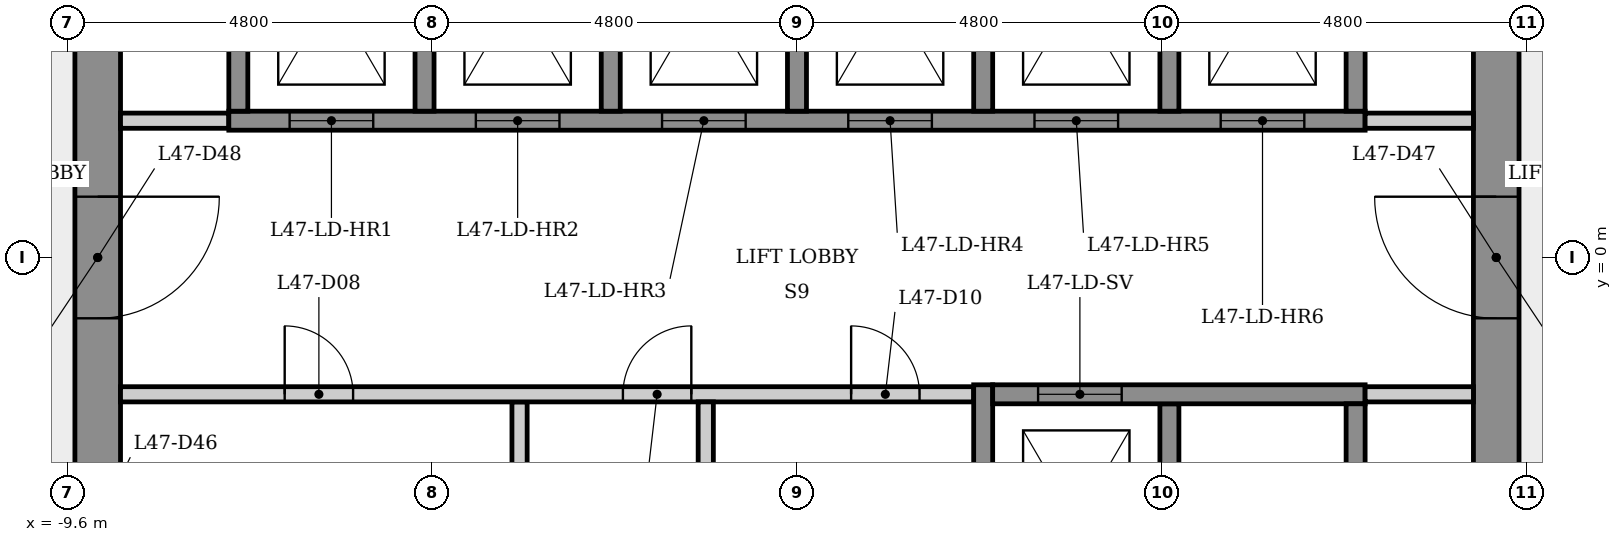
"""IFC4 building model, lengths in metres.
Left out: names, types, materials, properties, quantities, classifications, styles, units other than length and angle.
Written with IfcOpenShell. Run it as: python <this file> out.ifc"""

import sys

from ifc_helpers import new_model, si_unit, direction, frame, frame_2d, origin, place, context, subcontext, project, spatial, rectangle, extrude, element, fill, save


model = new_model("IFC4")
c1 = context("Model", 3, precision=1e-05, world=origin(), true_north=direction((0.0, 1.0)))
c2 = subcontext(c1, "Body", "Model", "MODEL_VIEW")
j1 = project(units=[si_unit("LENGTHUNIT", "METRE"), si_unit("PLANEANGLEUNIT", "RADIAN")], contexts=[c1])
p1 = place(None, origin())
s1 = spatial("IfcSite", under=j1, at=p1, CompositionType="ELEMENT")
p2 = place(p1, origin())
s2 = spatial("IfcBuilding", under=s1, at=p2, CompositionType="ELEMENT")
p3 = place(p2, frame((0.0, 0.0, 176.5)))
s3 = spatial("IfcBuildingStorey", under=s2, at=p3, CompositionType="ELEMENT", Elevation=176.5)
p4 = place(p3, frame((9.2, -5.485, 0.0), z_axis=(0.0, 0.0, 1.0), x_axis=(0.0, 1.0, 0.0)))
e1 = element("IfcWall", 1, at=p4, inside=s3, PredefinedType="SHEAR", context=c2, shape_type="SweptSolid", body=[
    extrude(rectangle(XDim=10.97, YDim=0.6, at=frame_2d((5.485, 0.0))), origin(), (0.0, 0.0, 1.0), 3.4),
])
p5 = place(p4, frame((4.685, 0.0, 0.0)))
e2 = element("IfcOpeningElement", 2, at=p5, cuts=e1, PredefinedType="OPENING", context=c2, shape_type="SweptSolid", body=[
    extrude(rectangle(XDim=1.6, YDim=2.1, at=frame_2d((0.8, 1.05))), frame((0.0, 0.31, 0.0), z_axis=(0.0, -1.0, 0.0), x_axis=(1.0, 0.0, 0.0)), (0.0, 0.0, 1.0), 0.62),
])
p6 = place(p3, frame((-9.2, 5.485, 0.0), z_axis=(0.0, 0.0, 1.0), x_axis=(0.0, -1.0, 0.0)))
e3 = element("IfcWall", 3, at=p6, inside=s3, PredefinedType="SHEAR", context=c2, shape_type="SweptSolid", body=[
    extrude(rectangle(XDim=10.97, YDim=0.6, at=frame_2d((5.485, 0.0))), origin(), (0.0, 0.0, 1.0), 3.4),
])
p7 = place(p6, frame((8.516, 0.0, 0.0)))
e4 = element("IfcOpeningElement", 4, at=p7, cuts=e3, PredefinedType="OPENING", context=c2, shape_type="SweptSolid", body=[
    extrude(rectangle(XDim=0.9, YDim=2.1, at=frame_2d((0.45, 1.05))), frame((0.0, 0.31, 0.0), z_axis=(0.0, -1.0, 0.0), x_axis=(1.0, 0.0, 0.0)), (0.0, 0.0, 1.0), 0.62),
])
p8 = place(p6, frame((4.685, 0.0, 0.0)))
e5 = element("IfcOpeningElement", 5, at=p8, cuts=e3, PredefinedType="OPENING", context=c2, shape_type="SweptSolid", body=[
    extrude(rectangle(XDim=1.6, YDim=2.1, at=frame_2d((0.8, 1.05))), frame((0.0, 0.31, 0.0), z_axis=(0.0, -1.0, 0.0), x_axis=(1.0, 0.0, 0.0)), (0.0, 0.0, 1.0), 0.62),
])
p9 = place(p3, frame((-8.9, 1.8, 0.0), z_axis=(0.0, 0.0, 1.0), x_axis=(1.0, 0.0, 0.0)))
e6 = element("IfcWall", 6, at=p9, inside=s3, PredefinedType="PARTITIONING", context=c2, shape_type="SweptSolid", body=[
    extrude(rectangle(XDim=1.425, YDim=0.2, at=frame_2d((0.712, 0.0))), origin(), (0.0, 0.0, 1.0), 3.05),
])
p10 = place(p3, frame((-7.475, 1.8, 0.0), z_axis=(0.0, 0.0, 1.0), x_axis=(1.0, 0.0, 0.0)))
e7 = element("IfcWall", 7, at=p10, inside=s3, PredefinedType="SHEAR", context=c2, shape_type="SweptSolid", body=[
    extrude(rectangle(XDim=14.95, YDim=0.25, at=frame_2d((7.475, 0.0))), origin(), (0.0, 0.0, 1.0), 3.05),
])
p11 = place(p10, frame((0.8, 0.0, 0.0)))
e8 = element("IfcOpeningElement", 8, at=p11, cuts=e7, PredefinedType="OPENING", context=c2, shape_type="SweptSolid", body=[
    extrude(rectangle(XDim=1.1, YDim=2.1, at=frame_2d((0.55, 1.05))), frame((0.0, 0.135, 0.0), z_axis=(0.0, -1.0, 0.0), x_axis=(1.0, 0.0, 0.0)), (0.0, 0.0, 1.0), 0.27),
])
p12 = place(p10, frame((3.25, 0.0, 0.0)))
e9 = element("IfcOpeningElement", 9, at=p12, cuts=e7, PredefinedType="OPENING", context=c2, shape_type="SweptSolid", body=[
    extrude(rectangle(XDim=1.1, YDim=2.1, at=frame_2d((0.55, 1.05))), frame((0.0, 0.135, 0.0), z_axis=(0.0, -1.0, 0.0), x_axis=(1.0, 0.0, 0.0)), (0.0, 0.0, 1.0), 0.27),
])
p13 = place(p10, frame((5.7, 0.0, 0.0)))
e10 = element("IfcOpeningElement", 10, at=p13, cuts=e7, PredefinedType="OPENING", context=c2, shape_type="SweptSolid", body=[
    extrude(rectangle(XDim=1.1, YDim=2.1, at=frame_2d((0.55, 1.05))), frame((0.0, 0.135, 0.0), z_axis=(0.0, -1.0, 0.0), x_axis=(1.0, 0.0, 0.0)), (0.0, 0.0, 1.0), 0.27),
])
p14 = place(p10, frame((8.15, 0.0, 0.0)))
e11 = element("IfcOpeningElement", 11, at=p14, cuts=e7, PredefinedType="OPENING", context=c2, shape_type="SweptSolid", body=[
    extrude(rectangle(XDim=1.1, YDim=2.1, at=frame_2d((0.55, 1.05))), frame((0.0, 0.135, 0.0), z_axis=(0.0, -1.0, 0.0), x_axis=(1.0, 0.0, 0.0)), (0.0, 0.0, 1.0), 0.27),
])
p15 = place(p10, frame((10.6, 0.0, 0.0)))
e12 = element("IfcOpeningElement", 12, at=p15, cuts=e7, PredefinedType="OPENING", context=c2, shape_type="SweptSolid", body=[
    extrude(rectangle(XDim=1.1, YDim=2.1, at=frame_2d((0.55, 1.05))), frame((0.0, 0.135, 0.0), z_axis=(0.0, -1.0, 0.0), x_axis=(1.0, 0.0, 0.0)), (0.0, 0.0, 1.0), 0.27),
])
p16 = place(p10, frame((13.05, 0.0, 0.0)))
e13 = element("IfcOpeningElement", 13, at=p16, cuts=e7, PredefinedType="OPENING", context=c2, shape_type="SweptSolid", body=[
    extrude(rectangle(XDim=1.1, YDim=2.1, at=frame_2d((0.55, 1.05))), frame((0.0, 0.135, 0.0), z_axis=(0.0, -1.0, 0.0), x_axis=(1.0, 0.0, 0.0)), (0.0, 0.0, 1.0), 0.27),
])
p17 = place(p3, frame((-7.35, 1.925, 0.0), z_axis=(0.0, 0.0, 1.0), x_axis=(0.0, 1.0, 0.0)))
e14 = element("IfcWall", 14, at=p17, inside=s3, PredefinedType="SHEAR", context=c2, shape_type="SweptSolid", body=[
    extrude(rectangle(XDim=4.036, YDim=0.25, at=frame_2d((2.018, 0.0))), origin(), (0.0, 0.0, 1.0), 3.05),
])
p18 = place(p3, frame((-4.9, 5.025, 0.0), z_axis=(0.0, 0.0, 1.0), x_axis=(0.0, -1.0, 0.0)))
e15 = element("IfcWall", 15, at=p18, inside=s3, PredefinedType="SHEAR", context=c2, shape_type="SweptSolid", body=[
    extrude(rectangle(XDim=3.1, YDim=0.25, at=frame_2d((1.55, 0.0))), origin(), (0.0, 0.0, 1.0), 3.4),
])
p19 = place(p3, frame((-3.65, -1.9, 0.0), z_axis=(0.0, 0.0, 1.0), x_axis=(0.0, -1.0, 0.0)))
e16 = element("IfcWall", 16, at=p19, inside=s3, PredefinedType="PARTITIONING", context=c2, shape_type="SweptSolid", body=[
    extrude(rectangle(XDim=3.15, YDim=0.2, at=frame_2d((1.575, 0.0))), origin(), (0.0, 0.0, 1.0), 3.05),
])
p20 = place(p3, frame((-8.9, -1.8, 0.0), z_axis=(0.0, 0.0, 1.0), x_axis=(1.0, 0.0, 0.0)))
e17 = element("IfcWall", 17, at=p20, inside=s3, PredefinedType="PARTITIONING", context=c2, shape_type="SweptSolid", body=[
    extrude(rectangle(XDim=11.225, YDim=0.2, at=frame_2d((5.613, 0.0))), origin(), (0.0, 0.0, 1.0), 3.05),
])
p21 = place(p20, frame((2.16, 0.0, 0.0)))
e18 = element("IfcOpeningElement", 18, at=p21, cuts=e17, PredefinedType="OPENING", context=c2, shape_type="SweptSolid", body=[
    extrude(rectangle(XDim=0.9, YDim=2.1, at=frame_2d((0.45, 1.05))), frame((0.0, 0.11, 0.0), z_axis=(0.0, -1.0, 0.0), x_axis=(1.0, 0.0, 0.0)), (0.0, 0.0, 1.0), 0.22),
])
p22 = place(p20, frame((6.61, 0.0, 0.0)))
e19 = element("IfcOpeningElement", 19, at=p22, cuts=e17, PredefinedType="OPENING", context=c2, shape_type="SweptSolid", body=[
    extrude(rectangle(XDim=0.9, YDim=2.1, at=frame_2d((0.45, 1.05))), frame((0.0, 0.11, 0.0), z_axis=(0.0, -1.0, 0.0), x_axis=(1.0, 0.0, 0.0)), (0.0, 0.0, 1.0), 0.22),
])
p23 = place(p20, frame((9.613, 0.0, 0.0)))
e20 = element("IfcOpeningElement", 20, at=p23, cuts=e17, PredefinedType="OPENING", context=c2, shape_type="SweptSolid", body=[
    extrude(rectangle(XDim=0.9, YDim=2.1, at=frame_2d((0.45, 1.05))), frame((0.0, 0.11, 0.0), z_axis=(0.0, -1.0, 0.0), x_axis=(1.0, 0.0, 0.0)), (0.0, 0.0, 1.0), 0.22),
])
p24 = place(p3, frame((-2.45, 5.025, 0.0), z_axis=(0.0, 0.0, 1.0), x_axis=(0.0, -1.0, 0.0)))
e21 = element("IfcWall", 21, at=p24, inside=s3, PredefinedType="SHEAR", context=c2, shape_type="SweptSolid", body=[
    extrude(rectangle(XDim=3.1, YDim=0.25, at=frame_2d((1.55, 0.0))), origin(), (0.0, 0.0, 1.0), 3.4),
])
p25 = place(p3, frame((-1.2, -1.9, 0.0), z_axis=(0.0, 0.0, 1.0), x_axis=(0.0, -1.0, 0.0)))
e22 = element("IfcWall", 22, at=p25, inside=s3, PredefinedType="PARTITIONING", context=c2, shape_type="SweptSolid", body=[
    extrude(rectangle(XDim=3.15, YDim=0.2, at=frame_2d((1.575, 0.0))), origin(), (0.0, 0.0, 1.0), 3.05),
])
p26 = place(p3, frame((0.0, 5.025, 0.0), z_axis=(0.0, 0.0, 1.0), x_axis=(0.0, -1.0, 0.0)))
e23 = element("IfcWall", 23, at=p26, inside=s3, PredefinedType="SHEAR", context=c2, shape_type="SweptSolid", body=[
    extrude(rectangle(XDim=3.1, YDim=0.25, at=frame_2d((1.55, 0.0))), origin(), (0.0, 0.0, 1.0), 3.4),
])
p27 = place(p3, frame((2.45, -5.275, 0.0), z_axis=(0.0, 0.0, 1.0), x_axis=(0.0, 1.0, 0.0)))
e24 = element("IfcWall", 24, at=p27, inside=s3, PredefinedType="SHEAR", context=c2, shape_type="SweptSolid", body=[
    extrude(rectangle(XDim=3.6, YDim=0.25, at=frame_2d((1.8, 0.0))), origin(), (0.0, 0.0, 1.0), 3.05),
])
for number, where, z_axis, x_axis in (
    (25, (2.45, 5.025, 0.0), (0.0, 0.0, 1.0), (0.0, -1.0, 0.0)),
    (26, (4.9, -1.925, 0.0), (0.0, 0.0, 1.0), (0.0, -1.0, 0.0)),
    (27, (4.9, 5.025, 0.0), (0.0, 0.0, 1.0), (0.0, -1.0, 0.0)),
):
    element("IfcWall", number, at=place(p3, frame(where, z_axis=z_axis, x_axis=x_axis)), inside=s3, PredefinedType="SHEAR", context=c2, shape_type="SweptSolid", body=[
        extrude(rectangle(XDim=3.1, YDim=0.25, at=frame_2d((1.55, 0.0))), origin(), (0.0, 0.0, 1.0), 3.4),
    ])
p28 = place(p3, frame((2.575, -1.8, 0.0), z_axis=(0.0, 0.0, 1.0), x_axis=(1.0, 0.0, 0.0)))
e28 = element("IfcWall", 28, at=p28, inside=s3, PredefinedType="SHEAR", context=c2, shape_type="SweptSolid", body=[
    extrude(rectangle(XDim=4.9, YDim=0.25, at=frame_2d((2.45, 0.0))), origin(), (0.0, 0.0, 1.0), 3.05),
])
p29 = place(p28, frame((0.597, 0.0, 0.0)))
e29 = element("IfcOpeningElement", 29, at=p29, cuts=e28, PredefinedType="OPENING", context=c2, shape_type="SweptSolid", body=[
    extrude(rectangle(XDim=1.1, YDim=2.1, at=frame_2d((0.55, 1.05))), frame((0.0, 0.135, 0.0), z_axis=(0.0, -1.0, 0.0), x_axis=(1.0, 0.0, 0.0)), (0.0, 0.0, 1.0), 0.27),
])
p30 = place(p3, frame((7.475, 1.8, 0.0), z_axis=(0.0, 0.0, 1.0), x_axis=(1.0, 0.0, 0.0)))
e30 = element("IfcWall", 30, at=p30, inside=s3, PredefinedType="PARTITIONING", context=c2, shape_type="SweptSolid", body=[
    extrude(rectangle(XDim=1.425, YDim=0.2, at=frame_2d((0.712, 0.0))), origin(), (0.0, 0.0, 1.0), 3.05),
])
for number, where, z_axis, x_axis in (
    (31, (7.35, -1.925, 0.0), (0.0, 0.0, 1.0), (0.0, -1.0, 0.0)),
    (32, (7.35, 5.025, 0.0), (0.0, 0.0, 1.0), (0.0, -1.0, 0.0)),
):
    element("IfcWall", number, at=place(p3, frame(where, z_axis=z_axis, x_axis=x_axis)), inside=s3, PredefinedType="SHEAR", context=c2, shape_type="SweptSolid", body=[
        extrude(rectangle(XDim=3.1, YDim=0.25, at=frame_2d((1.55, 0.0))), origin(), (0.0, 0.0, 1.0), 3.4),
    ])
p31 = place(p3, frame((8.9, -1.8, 0.0), z_axis=(0.0, 0.0, 1.0), x_axis=(-1.0, 0.0, 0.0)))
e33 = element("IfcWall", 33, at=p31, inside=s3, PredefinedType="PARTITIONING", context=c2, shape_type="SweptSolid", body=[
    extrude(rectangle(XDim=1.425, YDim=0.2, at=frame_2d((0.712, 0.0))), origin(), (0.0, 0.0, 1.0), 3.05),
])
p32 = place(p11, origin())
e34 = element("IfcDoor", 34, at=p32, inside=s3, OperationType="SLIDING_TO_LEFT", PredefinedType="DOOR", context=c2, shape_type="SweptSolid", body=[
    extrude(rectangle(XDim=1.1, YDim=2.1, at=frame_2d((0.55, 1.05))), frame((0.0, 0.025, 0.0), z_axis=(0.0, -1.0, 0.0), x_axis=(1.0, 0.0, 0.0)), (0.0, 0.0, 1.0), 0.05),
])
fill(e8, e34)
p33 = place(p12, origin())
e35 = element("IfcDoor", 35, at=p33, inside=s3, OperationType="SLIDING_TO_LEFT", PredefinedType="DOOR", context=c2, shape_type="SweptSolid", body=[
    extrude(rectangle(XDim=1.1, YDim=2.1, at=frame_2d((0.55, 1.05))), frame((0.0, 0.025, 0.0), z_axis=(0.0, -1.0, 0.0), x_axis=(1.0, 0.0, 0.0)), (0.0, 0.0, 1.0), 0.05),
])
fill(e9, e35)
p34 = place(p13, origin())
e36 = element("IfcDoor", 36, at=p34, inside=s3, OperationType="SLIDING_TO_LEFT", PredefinedType="DOOR", context=c2, shape_type="SweptSolid", body=[
    extrude(rectangle(XDim=1.1, YDim=2.1, at=frame_2d((0.55, 1.05))), frame((0.0, 0.025, 0.0), z_axis=(0.0, -1.0, 0.0), x_axis=(1.0, 0.0, 0.0)), (0.0, 0.0, 1.0), 0.05),
])
fill(e10, e36)
p35 = place(p14, origin())
e37 = element("IfcDoor", 37, at=p35, inside=s3, OperationType="SLIDING_TO_LEFT", PredefinedType="DOOR", context=c2, shape_type="SweptSolid", body=[
    extrude(rectangle(XDim=1.1, YDim=2.1, at=frame_2d((0.55, 1.05))), frame((0.0, 0.025, 0.0), z_axis=(0.0, -1.0, 0.0), x_axis=(1.0, 0.0, 0.0)), (0.0, 0.0, 1.0), 0.05),
])
fill(e11, e37)
p36 = place(p15, origin())
e38 = element("IfcDoor", 38, at=p36, inside=s3, OperationType="SLIDING_TO_LEFT", PredefinedType="DOOR", context=c2, shape_type="SweptSolid", body=[
    extrude(rectangle(XDim=1.1, YDim=2.1, at=frame_2d((0.55, 1.05))), frame((0.0, 0.025, 0.0), z_axis=(0.0, -1.0, 0.0), x_axis=(1.0, 0.0, 0.0)), (0.0, 0.0, 1.0), 0.05),
])
fill(e12, e38)
p37 = place(p16, origin())
e39 = element("IfcDoor", 39, at=p37, inside=s3, OperationType="SLIDING_TO_LEFT", PredefinedType="DOOR", context=c2, shape_type="SweptSolid", body=[
    extrude(rectangle(XDim=1.1, YDim=2.1, at=frame_2d((0.55, 1.05))), frame((0.0, 0.025, 0.0), z_axis=(0.0, -1.0, 0.0), x_axis=(1.0, 0.0, 0.0)), (0.0, 0.0, 1.0), 0.05),
])
fill(e13, e39)
p38 = place(p29, origin())
e40 = element("IfcDoor", 40, at=p38, inside=s3, OperationType="SLIDING_TO_LEFT", PredefinedType="DOOR", context=c2, shape_type="SweptSolid", body=[
    extrude(rectangle(XDim=1.1, YDim=2.1, at=frame_2d((0.55, 1.05))), frame((0.0, 0.025, 0.0), z_axis=(0.0, -1.0, 0.0), x_axis=(1.0, 0.0, 0.0)), (0.0, 0.0, 1.0), 0.05),
])
fill(e29, e40)
p39 = place(p21, origin())
e41 = element("IfcDoor", 41, at=p39, inside=s3, OperationType="SINGLE_SWING_LEFT", PredefinedType="DOOR", context=c2, shape_type="SweptSolid", body=[
    extrude(rectangle(XDim=0.9, YDim=2.1, at=frame_2d((0.45, 1.05))), frame((0.0, 0.025, 0.0), z_axis=(0.0, -1.0, 0.0), x_axis=(1.0, 0.0, 0.0)), (0.0, 0.0, 1.0), 0.05),
])
fill(e18, e41)
p40 = place(p22, origin())
e42 = element("IfcDoor", 42, at=p40, inside=s3, OperationType="SINGLE_SWING_RIGHT", PredefinedType="DOOR", context=c2, shape_type="SweptSolid", body=[
    extrude(rectangle(XDim=0.9, YDim=2.1, at=frame_2d((0.45, 1.05))), frame((0.0, 0.025, 0.0), z_axis=(0.0, -1.0, 0.0), x_axis=(1.0, 0.0, 0.0)), (0.0, 0.0, 1.0), 0.05),
])
fill(e19, e42)
p41 = place(p23, origin())
e43 = element("IfcDoor", 43, at=p41, inside=s3, OperationType="SINGLE_SWING_LEFT", PredefinedType="DOOR", context=c2, shape_type="SweptSolid", body=[
    extrude(rectangle(XDim=0.9, YDim=2.1, at=frame_2d((0.45, 1.05))), frame((0.0, 0.025, 0.0), z_axis=(0.0, -1.0, 0.0), x_axis=(1.0, 0.0, 0.0)), (0.0, 0.0, 1.0), 0.05),
])
fill(e20, e43)
p42 = place(p5, origin())
e44 = element("IfcDoor", 44, at=p42, inside=s3, OperationType="SINGLE_SWING_RIGHT", PredefinedType="DOOR", context=c2, shape_type="SweptSolid", body=[
    extrude(rectangle(XDim=1.6, YDim=2.1, at=frame_2d((0.8, 1.05))), frame((0.0, 0.025, 0.0), z_axis=(0.0, -1.0, 0.0), x_axis=(1.0, 0.0, 0.0)), (0.0, 0.0, 1.0), 0.05),
])
fill(e2, e44)
p43 = place(p8, origin())
e45 = element("IfcDoor", 45, at=p43, inside=s3, OperationType="SINGLE_SWING_LEFT", PredefinedType="DOOR", context=c2, shape_type="SweptSolid", body=[
    extrude(rectangle(XDim=1.6, YDim=2.1, at=frame_2d((0.8, 1.05))), frame((0.0, 0.025, 0.0), z_axis=(0.0, -1.0, 0.0), x_axis=(1.0, 0.0, 0.0)), (0.0, 0.0, 1.0), 0.05),
])
fill(e5, e45)
save(model, sys.argv[1])
